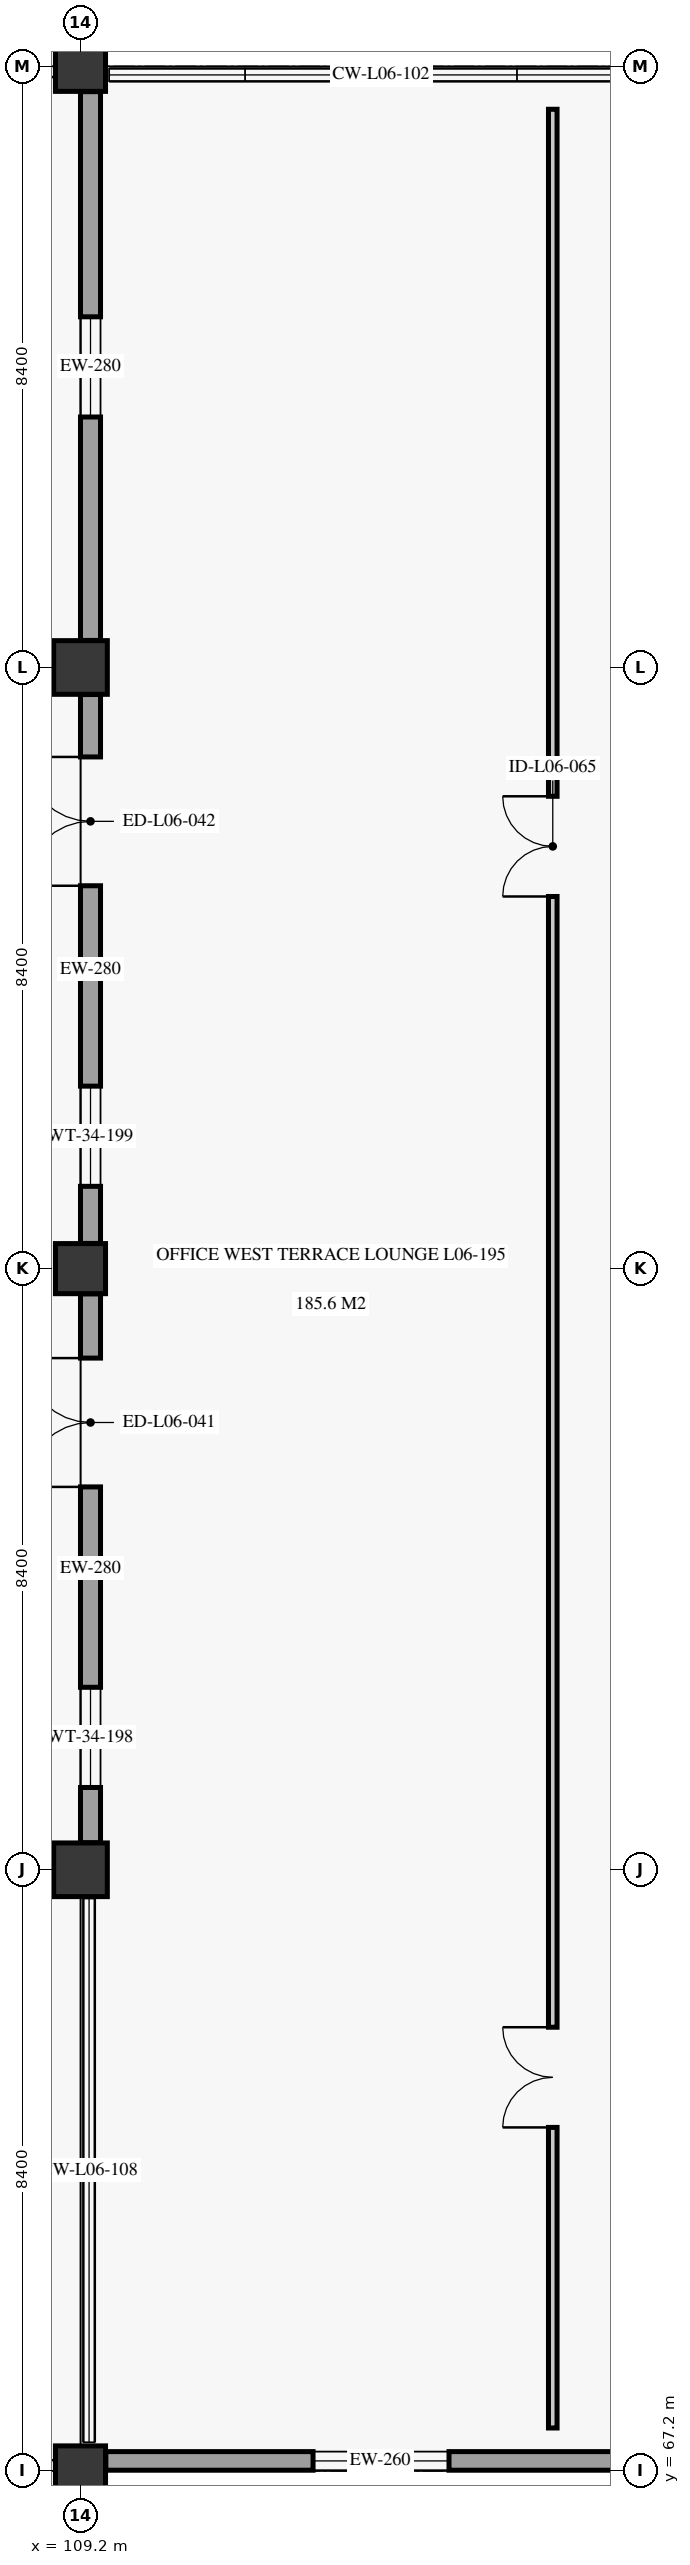
"""IFC4 building model, lengths in metres.
Left out: names, types, materials, properties, quantities, classifications, styles, units other than length and angle.
Written with IfcOpenShell. Run it as: python <this file> out.ifc"""

import sys

from ifc_helpers import new_model, si_unit, direction, frame, frame_2d, origin, origin_2d, place, context, subcontext, project, spatial, rectangle, extrude, element, fill, save


model = new_model("IFC4")
c1 = context("Model", 3, precision=1e-05, world=origin(), true_north=direction((0.0, 1.0)))
c2 = subcontext(c1, "Body", "Model", "MODEL_VIEW")
j1 = project(units=[si_unit("LENGTHUNIT", "METRE"), si_unit("PLANEANGLEUNIT", "RADIAN")], contexts=[c1])
p1 = place(None, origin())
s1 = spatial("IfcSite", under=j1, at=p1, CompositionType="ELEMENT")
p2 = place(p1, origin())
s2 = spatial("IfcBuilding", under=s1, at=p2, CompositionType="ELEMENT")
p3 = place(p2, frame((0.0, 0.0, 26.7)))
s3 = spatial("IfcBuildingStorey", under=s2, at=p3, CompositionType="ELEMENT", Elevation=26.7)
p4 = place(p3, frame((109.2, 67.2, 0.0), z_axis=(0.0, 0.0, 1.0), x_axis=(1.0, 0.0, 0.0)))
e1 = element("IfcColumn", 1, at=p4, inside=s3, PredefinedType="COLUMN", context=c2, shape_type="SweptSolid", body=[
    extrude(rectangle(XDim=0.7, YDim=0.7, at=origin_2d()), origin(), (0.0, 0.0, 1.0), 3.72),
])
p5 = place(p3, frame((109.2, 75.6, 0.0), z_axis=(0.0, 0.0, 1.0), x_axis=(1.0, 0.0, 0.0)))
e2 = element("IfcColumn", 2, at=p5, inside=s3, PredefinedType="COLUMN", context=c2, shape_type="SweptSolid", body=[
    extrude(rectangle(XDim=0.75, YDim=0.75, at=origin_2d()), origin(), (0.0, 0.0, 1.0), 3.72),
])
p6 = place(p3, frame((109.2, 84.0, 0.0), z_axis=(0.0, 0.0, 1.0), x_axis=(1.0, 0.0, 0.0)))
e3 = element("IfcColumn", 3, at=p6, inside=s3, PredefinedType="COLUMN", context=c2, shape_type="SweptSolid", body=[
    extrude(rectangle(XDim=0.7, YDim=0.7, at=origin_2d()), origin(), (0.0, 0.0, 1.0), 3.72),
])
p7 = place(p3, frame((109.2, 92.4, 0.0), z_axis=(0.0, 0.0, 1.0), x_axis=(1.0, 0.0, 0.0)))
e4 = element("IfcColumn", 4, at=p7, inside=s3, PredefinedType="COLUMN", context=c2, shape_type="SweptSolid", body=[
    extrude(rectangle(XDim=0.75, YDim=0.75, at=origin_2d()), origin(), (0.0, 0.0, 1.0), 3.72),
])
p8 = place(p3, frame((109.2, 100.8, 0.0), z_axis=(0.0, 0.0, 1.0), x_axis=(1.0, 0.0, 0.0)))
e5 = element("IfcColumn", 5, at=p8, inside=s3, PredefinedType="COLUMN", context=c2, shape_type="SweptSolid", body=[
    extrude(rectangle(XDim=0.7, YDim=0.7, at=origin_2d()), origin(), (0.0, 0.0, 1.0), 3.72),
])
p9 = place(p3, frame((109.554, 67.34, 0.0), z_axis=(0.0, 0.0, 1.0), x_axis=(1.0, 0.0, 0.0)))
e6 = element("IfcWall", 6, at=p9, inside=s3, PredefinedType="SOLIDWALL", context=c2, shape_type="SweptSolid", body=[
    extrude(rectangle(XDim=7.668, YDim=0.26, at=frame_2d((3.834, 0.0))), origin(), (0.0, 0.0, 1.0), 3.04),
])
p10 = place(p9, frame((2.896, 0.0, 0.85)))
e7 = element("IfcOpeningElement", 7, at=p10, cuts=e6, PredefinedType="OPENING", context=c2, shape_type="SweptSolid", body=[
    extrude(rectangle(XDim=1.9, YDim=1.75, at=frame_2d((0.95, 0.875))), frame((0.0, 0.14, 0.0), z_axis=(0.0, -1.0, 0.0), x_axis=(1.0, 0.0, 0.0)), (0.0, 0.0, 1.0), 0.28),
])
p11 = place(p3, frame((109.34, 75.978, 0.0), z_axis=(0.0, 0.0, 1.0), x_axis=(0.0, 1.0, 0.0)))
e8 = element("IfcWall", 8, at=p11, inside=s3, PredefinedType="SOLIDWALL", context=c2, shape_type="SweptSolid", body=[
    extrude(rectangle(XDim=7.67, YDim=0.28, at=frame_2d((3.835, 0.0))), origin(), (0.0, 0.0, 1.0), 3.04),
])
p12 = place(p11, frame((0.772, 0.0, 0.85)))
e9 = element("IfcOpeningElement", 9, at=p12, cuts=e8, PredefinedType="OPENING", context=c2, shape_type="SweptSolid", body=[
    extrude(rectangle(XDim=1.4, YDim=1.7, at=frame_2d((0.7, 0.85))), frame((0.0, 0.15, 0.0), z_axis=(0.0, -1.0, 0.0), x_axis=(1.0, 0.0, 0.0)), (0.0, 0.0, 1.0), 0.3),
])
p13 = place(p11, frame((4.972, 0.0, 0.0)))
e10 = element("IfcOpeningElement", 10, at=p13, cuts=e8, PredefinedType="OPENING", context=c2, shape_type="SweptSolid", body=[
    extrude(rectangle(XDim=1.8, YDim=2.35, at=frame_2d((0.9, 1.175))), frame((0.0, 0.15, 0.0), z_axis=(0.0, -1.0, 0.0), x_axis=(1.0, 0.0, 0.0)), (0.0, 0.0, 1.0), 0.3),
])
p14 = place(p3, frame((109.34, 84.352, 0.0), z_axis=(0.0, 0.0, 1.0), x_axis=(0.0, 1.0, 0.0)))
e11 = element("IfcWall", 11, at=p14, inside=s3, PredefinedType="SOLIDWALL", context=c2, shape_type="SweptSolid", body=[
    extrude(rectangle(XDim=7.67, YDim=0.28, at=frame_2d((3.835, 0.0))), origin(), (0.0, 0.0, 1.0), 3.04),
])
p15 = place(p14, frame((0.798, 0.0, 0.85)))
e12 = element("IfcOpeningElement", 12, at=p15, cuts=e11, PredefinedType="OPENING", context=c2, shape_type="SweptSolid", body=[
    extrude(rectangle(XDim=1.4, YDim=1.7, at=frame_2d((0.7, 0.85))), frame((0.0, 0.15, 0.0), z_axis=(0.0, -1.0, 0.0), x_axis=(1.0, 0.0, 0.0)), (0.0, 0.0, 1.0), 0.3),
])
p16 = place(p14, frame((4.998, 0.0, 0.0)))
e13 = element("IfcOpeningElement", 13, at=p16, cuts=e11, PredefinedType="OPENING", context=c2, shape_type="SweptSolid", body=[
    extrude(rectangle(XDim=1.8, YDim=2.35, at=frame_2d((0.9, 1.175))), frame((0.0, 0.15, 0.0), z_axis=(0.0, -1.0, 0.0), x_axis=(1.0, 0.0, 0.0)), (0.0, 0.0, 1.0), 0.3),
])
p17 = place(p3, frame((109.34, 92.778, 0.0), z_axis=(0.0, 0.0, 1.0), x_axis=(0.0, 1.0, 0.0)))
e14 = element("IfcWall", 14, at=p17, inside=s3, PredefinedType="SOLIDWALL", context=c2, shape_type="SweptSolid", body=[
    extrude(rectangle(XDim=7.668, YDim=0.28, at=frame_2d((3.834, 0.0))), origin(), (0.0, 0.0, 1.0), 3.04),
])
p18 = place(p17, frame((3.122, 0.0, 0.85)))
e15 = element("IfcOpeningElement", 15, at=p18, cuts=e14, PredefinedType="OPENING", context=c2, shape_type="SweptSolid", body=[
    extrude(rectangle(XDim=1.4, YDim=1.7, at=frame_2d((0.7, 0.85))), frame((0.0, 0.15, 0.0), z_axis=(0.0, -1.0, 0.0), x_axis=(1.0, 0.0, 0.0)), (0.0, 0.0, 1.0), 0.3),
])
p19 = place(p3, frame((115.8, 67.8, 0.0), z_axis=(0.0, 0.0, 1.0), x_axis=(0.0, 1.0, 0.0)))
e16 = element("IfcWall", 16, at=p19, inside=s3, PredefinedType="PARTITIONING", context=c2, shape_type="SweptSolid", body=[
    extrude(rectangle(XDim=32.4, YDim=0.12, at=frame_2d((16.2, 0.0))), origin(), (0.0, 0.0, 1.0), 3.34),
])
p20 = place(p19, frame((4.2, 0.0, 0.0)))
e17 = element("IfcOpeningElement", 17, at=p20, cuts=e16, PredefinedType="OPENING", context=c2, shape_type="SweptSolid", body=[
    extrude(rectangle(XDim=1.4, YDim=2.35, at=frame_2d((0.7, 1.175))), frame((0.0, 0.07, 0.0), z_axis=(0.0, -1.0, 0.0), x_axis=(1.0, 0.0, 0.0)), (0.0, 0.0, 1.0), 0.14),
])
p21 = place(p19, frame((21.4, 0.0, 0.0)))
e18 = element("IfcOpeningElement", 18, at=p21, cuts=e16, PredefinedType="OPENING", context=c2, shape_type="SweptSolid", body=[
    extrude(rectangle(XDim=1.4, YDim=2.35, at=frame_2d((0.7, 1.175))), frame((0.0, 0.07, 0.0), z_axis=(0.0, -1.0, 0.0), x_axis=(1.0, 0.0, 0.0)), (0.0, 0.0, 1.0), 0.14),
])
p22 = place(p10, origin())
e19 = element("IfcWindow", 19, at=p22, inside=s3, PartitioningType="SINGLE_PANEL", PredefinedType="WINDOW", context=c2, shape_type="SweptSolid", body=[
    extrude(rectangle(XDim=1.9, YDim=1.75, at=frame_2d((0.95, 0.875))), frame((0.0, 0.03, 0.0), z_axis=(0.0, -1.0, 0.0), x_axis=(1.0, 0.0, 0.0)), (0.0, 0.0, 1.0), 0.06),
])
fill(e7, e19)
p23 = place(p12, origin())
e20 = element("IfcWindow", 20, at=p23, inside=s3, PartitioningType="SINGLE_PANEL", PredefinedType="WINDOW", context=c2, shape_type="SweptSolid", body=[
    extrude(rectangle(XDim=1.4, YDim=1.7, at=frame_2d((0.7, 0.85))), frame((0.0, 0.03, 0.0), z_axis=(0.0, -1.0, 0.0), x_axis=(1.0, 0.0, 0.0)), (0.0, 0.0, 1.0), 0.06),
])
fill(e9, e20)
p24 = place(p13, origin())
e21 = element("IfcDoor", 21, at=p24, inside=s3, OperationType="DOUBLE_DOOR_SINGLE_SWING", PredefinedType="DOOR", context=c2, shape_type="SweptSolid", body=[
    extrude(rectangle(XDim=1.8, YDim=2.35, at=frame_2d((0.9, 1.175))), frame((0.0, 0.025, 0.0), z_axis=(0.0, -1.0, 0.0), x_axis=(1.0, 0.0, 0.0)), (0.0, 0.0, 1.0), 0.05),
])
fill(e10, e21)
p25 = place(p15, origin())
e22 = element("IfcWindow", 22, at=p25, inside=s3, PartitioningType="SINGLE_PANEL", PredefinedType="WINDOW", context=c2, shape_type="SweptSolid", body=[
    extrude(rectangle(XDim=1.4, YDim=1.7, at=frame_2d((0.7, 0.85))), frame((0.0, 0.03, 0.0), z_axis=(0.0, -1.0, 0.0), x_axis=(1.0, 0.0, 0.0)), (0.0, 0.0, 1.0), 0.06),
])
fill(e12, e22)
p26 = place(p16, origin())
e23 = element("IfcDoor", 23, at=p26, inside=s3, OperationType="DOUBLE_DOOR_SINGLE_SWING", PredefinedType="DOOR", context=c2, shape_type="SweptSolid", body=[
    extrude(rectangle(XDim=1.8, YDim=2.35, at=frame_2d((0.9, 1.175))), frame((0.0, 0.025, 0.0), z_axis=(0.0, -1.0, 0.0), x_axis=(1.0, 0.0, 0.0)), (0.0, 0.0, 1.0), 0.05),
])
fill(e13, e23)
p27 = place(p18, origin())
e24 = element("IfcWindow", 24, at=p27, inside=s3, PartitioningType="SINGLE_PANEL", PredefinedType="WINDOW", context=c2, shape_type="SweptSolid", body=[
    extrude(rectangle(XDim=1.4, YDim=1.7, at=frame_2d((0.7, 0.85))), frame((0.0, 0.03, 0.0), z_axis=(0.0, -1.0, 0.0), x_axis=(1.0, 0.0, 0.0)), (0.0, 0.0, 1.0), 0.06),
])
fill(e15, e24)
p28 = place(p20, origin())
e25 = element("IfcDoor", 25, at=p28, inside=s3, OperationType="DOUBLE_DOOR_SINGLE_SWING", PredefinedType="DOOR", context=c2, shape_type="SweptSolid", body=[
    extrude(rectangle(XDim=1.4, YDim=2.35, at=frame_2d((0.7, 1.175))), frame((0.0, 0.025, 0.0), z_axis=(0.0, -1.0, 0.0), x_axis=(1.0, 0.0, 0.0)), (0.0, 0.0, 1.0), 0.05),
])
fill(e17, e25)
p29 = place(p21, origin())
e26 = element("IfcDoor", 26, at=p29, inside=s3, OperationType="DOUBLE_DOOR_SINGLE_SWING", PredefinedType="DOOR", context=c2, shape_type="SweptSolid", body=[
    extrude(rectangle(XDim=1.4, YDim=2.35, at=frame_2d((0.7, 1.175))), frame((0.0, 0.025, 0.0), z_axis=(0.0, -1.0, 0.0), x_axis=(1.0, 0.0, 0.0)), (0.0, 0.0, 1.0), 0.05),
])
fill(e18, e26)
save(model, sys.argv[1])
